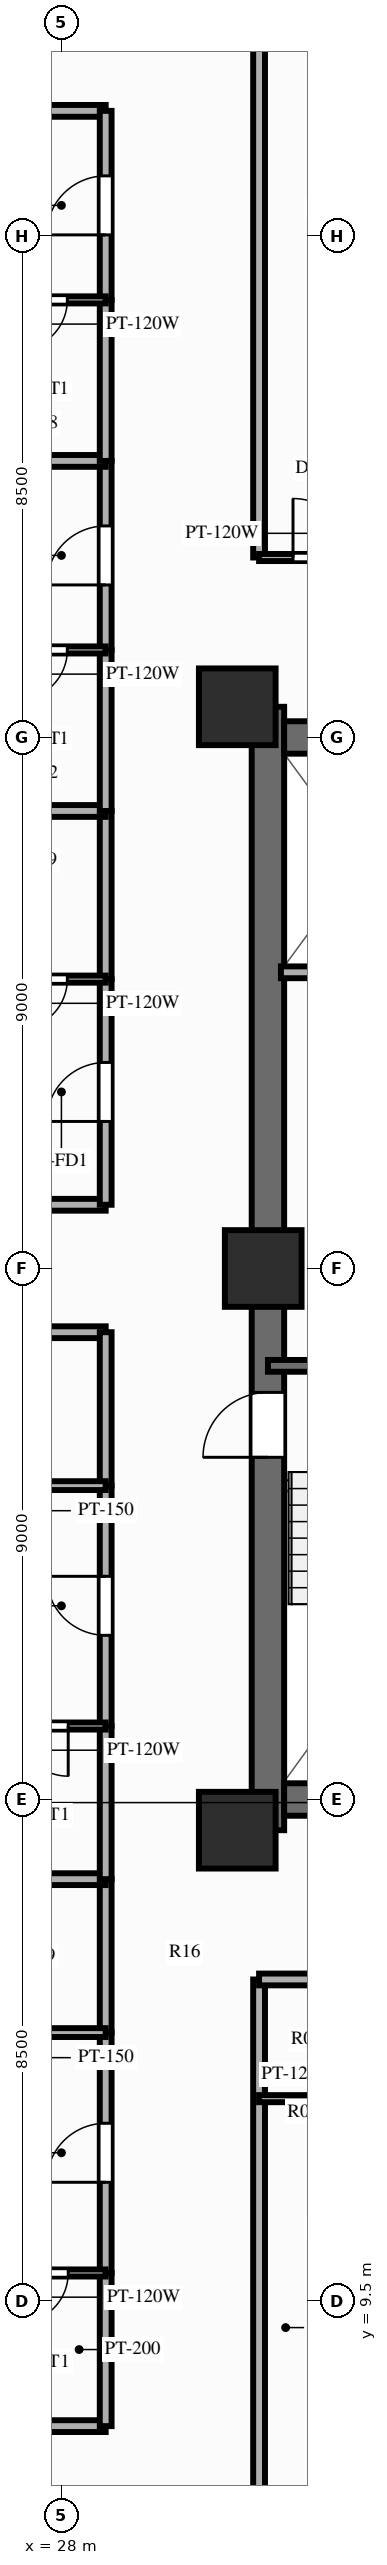
"""IFC4 building model, lengths in metres.
Left out: names, types, materials, properties, quantities, classifications, styles, units other than length and angle.
Written with IfcOpenShell. Run it as: python <this file> out.ifc"""

import sys

from ifc_helpers import new_model, si_unit, direction, frame, frame_2d, origin, origin_2d, place, context, subcontext, project, spatial, rectangle, extrude, source, transform, mapped, element, fill, save


model = new_model("IFC4")
c1 = context("Model", 3, precision=1e-05, world=origin(), true_north=direction((0.0, 1.0)))
c2 = subcontext(c1, "Body", "Model", "MODEL_VIEW")
j1 = project(units=[si_unit("LENGTHUNIT", "METRE"), si_unit("PLANEANGLEUNIT", "RADIAN")], contexts=[c1])
p1 = place(None, origin())
s1 = spatial("IfcSite", under=j1, at=p1, CompositionType="ELEMENT")
p2 = place(p1, origin())
s2 = spatial("IfcBuilding", under=s1, at=p2, CompositionType="ELEMENT")
p3 = place(p2, frame((0.0, 0.0, 119.85)))
s3 = spatial("IfcBuildingStorey", under=s2, at=p3, CompositionType="ELEMENT", Elevation=119.85)
p4 = place(p3, frame((31.5, 17.48, 0.0), z_axis=(0.0, 0.0, 1.0), x_axis=(0.0, 1.0, 0.0)))
e1 = element("IfcWall", 1, at=p4, inside=s3, PredefinedType="SHEAR", context=c2, shape_type="SweptSolid", body=[
    extrude(rectangle(XDim=19.04, YDim=0.55, at=frame_2d((9.52, 0.0))), origin(), (0.0, 0.0, 1.0), 3.0),
])
p5 = place(p4, frame((6.32, 0.0, 0.0)))
e2 = element("IfcOpeningElement", 2, at=p5, cuts=e1, PredefinedType="OPENING", context=c2, shape_type="SweptSolid", body=[
    extrude(rectangle(XDim=1.1, YDim=2.15, at=frame_2d((0.55, 1.075))), frame((0.0, 0.287, 0.0), z_axis=(0.0, -1.0, 0.0), x_axis=(1.0, 0.0, 0.0)), (0.0, 0.0, 1.0), 0.574),
])
p6 = place(p3, frame((31.775, 18.0, 0.0), z_axis=(0.0, 0.0, 1.0), x_axis=(1.0, 0.0, 0.0)))
e3 = element("IfcWall", 3, at=p6, inside=s3, PredefinedType="SHEAR", context=c2, shape_type="SweptSolid", body=[
    extrude(rectangle(XDim=12.45, YDim=0.55, at=frame_2d((6.225, 0.0))), origin(), (0.0, 0.0, 1.0), 3.0),
])
p7 = place(p3, frame((31.775, 36.0, 0.0), z_axis=(0.0, 0.0, 1.0), x_axis=(1.0, 0.0, 0.0)))
e4 = element("IfcWall", 4, at=p7, inside=s3, PredefinedType="SHEAR", context=c2, shape_type="SweptSolid", body=[
    extrude(rectangle(XDim=12.45, YDim=0.55, at=frame_2d((6.225, 0.0))), origin(), (0.0, 0.0, 1.0), 3.0),
])
p8 = place(p7, frame((5.175, 0.0, 0.0), z_axis=(0.0, 0.0, 1.0), x_axis=(-1.0, 0.0, 0.0)))
e5 = element("IfcOpeningElement", 5, at=p8, cuts=e4, PredefinedType="OPENING", context=c2, shape_type="SweptSolid", body=[
    extrude(rectangle(XDim=1.4, YDim=2.15, at=frame_2d((0.7, 1.075))), frame((0.0, 0.287, 0.0), z_axis=(0.0, -1.0, 0.0), x_axis=(1.0, 0.0, 0.0)), (0.0, 0.0, 1.0), 0.574),
])
m1 = source(origin(), c2, "Body", "SweptSolid", [
    extrude(rectangle(XDim=1.3, YDim=1.3, at=origin_2d()), origin(), (0.0, 0.0, 1.0), 3.0),
])
for number, where, z_axis, x_axis in (
    (6, (30.98, 17.48, 0.0), (0.0, 0.0, 1.0), (1.0, 0.0, 0.0)),
    (7, (30.98, 36.52, 0.0), (0.0, 0.0, 1.0), (1.0, 0.0, 0.0)),
    (8, (31.42, 27.0, 0.0), (0.0, 0.0, 1.0), (1.0, 0.0, 0.0)),
):
    element("IfcColumn", number, at=place(p3, frame(where, z_axis=z_axis, x_axis=x_axis)), inside=s3, PredefinedType="COLUMN", context=c2, shape_type="MappedRepresentation", body=[
        mapped(m1, transform((0.0, 0.0, 0.0), scale=1.0)),
    ])
p9 = place(p3, frame((31.5, 25.35, 0.0), z_axis=(0.0, 0.0, 1.0), x_axis=(1.0, 0.0, 0.0)))
e9 = element("IfcWall", 9, at=p9, inside=s3, PredefinedType="SOLIDWALL", context=c2, shape_type="SweptSolid", body=[
    extrude(rectangle(XDim=3.93, YDim=0.2, at=frame_2d((1.965, 0.0))), origin(), (0.0, 0.0, 1.0), 2.79),
])
p10 = place(p3, frame((31.72, 32.02, 0.0), z_axis=(0.0, 0.0, 1.0), x_axis=(1.0, 0.0, 0.0)))
e10 = element("IfcWall", 10, at=p10, inside=s3, PredefinedType="PARTITIONING", context=c2, shape_type="SweptSolid", body=[
    extrude(rectangle(XDim=2.8, YDim=0.2, at=frame_2d((1.4, 0.0))), origin(), (0.0, 0.0, 1.0), 2.79),
])
p11 = place(p3, frame((31.35, 14.95, 0.0), z_axis=(0.0, 0.0, 1.0), x_axis=(0.0, -1.0, 0.0)))
e11 = element("IfcWall", 11, at=p11, inside=s3, PredefinedType="PARTITIONING", context=c2, shape_type="SweptSolid", body=[
    extrude(rectangle(XDim=11.8, YDim=0.2, at=frame_2d((5.9, 0.0))), origin(), (0.0, 0.0, 1.0), 2.34),
])
p12 = place(p3, frame((31.35, 14.95, 0.0), z_axis=(0.0, 0.0, 1.0), x_axis=(1.0, 0.0, 0.0)))
e12 = element("IfcWall", 12, at=p12, inside=s3, PredefinedType="PARTITIONING", context=c2, shape_type="SweptSolid", body=[
    extrude(rectangle(XDim=3.458, YDim=0.2, at=frame_2d((1.729, 0.0))), origin(), (0.0, 0.0, 1.0), 2.79),
])
p13 = place(p3, frame((31.35, 12.93, 0.0), z_axis=(0.0, 0.0, 1.0), x_axis=(1.0, 0.0, 0.0)))
e13 = element("IfcWall", 13, at=p13, inside=s3, PredefinedType="PARTITIONING", context=c2, shape_type="SweptSolid", body=[
    extrude(rectangle(XDim=3.458, YDim=0.12, at=frame_2d((1.729, 0.0))), origin(), (0.0, 0.0, 1.0), 2.79),
])
p14 = place(p3, frame((31.35, 39.05, 0.0), z_axis=(0.0, 0.0, 1.0), x_axis=(0.0, 1.0, 0.0)))
e14 = element("IfcWall", 14, at=p14, inside=s3, PredefinedType="PARTITIONING", context=c2, shape_type="SweptSolid", body=[
    extrude(rectangle(XDim=11.8, YDim=0.2, at=frame_2d((5.9, 0.0))), origin(), (0.0, 0.0, 1.0), 2.34),
])
p15 = place(p3, frame((31.35, 39.05, 0.0), z_axis=(0.0, 0.0, 1.0), x_axis=(1.0, 0.0, 0.0)))
e15 = element("IfcWall", 15, at=p15, inside=s3, PredefinedType="PARTITIONING", context=c2, shape_type="SweptSolid", body=[
    extrude(rectangle(XDim=2.15, YDim=0.12, at=frame_2d((1.075, 0.0))), origin(), (0.0, 0.0, 1.0), 2.79),
])
p16 = place(p15, frame((0.575, 0.0, 0.0)))
e16 = element("IfcOpeningElement", 16, at=p16, cuts=e15, PredefinedType="OPENING", context=c2, shape_type="SweptSolid", body=[
    extrude(rectangle(XDim=1.0, YDim=2.1, at=frame_2d((0.5, 1.05))), frame((0.0, 0.072, 0.0), z_axis=(0.0, -1.0, 0.0), x_axis=(1.0, 0.0, 0.0)), (0.0, 0.0, 1.0), 0.144),
])
for number, where, z_axis, x_axis in (
    (17, (28.75, 7.38, 0.0), (0.0, 0.0, 1.0), (-1.0, 0.0, 0.0)),
    (18, (28.75, 25.92, 0.0), (0.0, 0.0, 1.0), (-1.0, 0.0, 0.0)),
):
    element("IfcWall", number, at=place(p3, frame(where, z_axis=z_axis, x_axis=x_axis)), inside=s3, PredefinedType="PARTITIONING", context=c2, shape_type="SweptSolid", body=[
        extrude(rectangle(XDim=16.6, YDim=0.2, at=frame_2d((8.3, 0.0))), origin(), (0.0, 0.0, 1.0), 2.79),
    ])
p17 = place(p3, frame((28.75, 7.38, 0.0), z_axis=(0.0, 0.0, 1.0), x_axis=(0.0, 1.0, 0.0)))
e19 = element("IfcWall", 19, at=p17, inside=s3, PredefinedType="PARTITIONING", context=c2, shape_type="SweptSolid", body=[
    extrude(rectangle(XDim=2.596, YDim=0.2, at=frame_2d((1.298, 0.0))), origin(), (0.0, 0.0, 1.0), 2.79),
])
p18 = place(p3, frame((28.75, 9.976, 0.0), z_axis=(0.0, 0.0, 1.0), x_axis=(0.0, 1.0, 0.0)))
e20 = element("IfcWall", 20, at=p18, inside=s3, PredefinedType="PARTITIONING", context=c2, shape_type="SweptSolid", body=[
    extrude(rectangle(XDim=4.074, YDim=0.2, at=frame_2d((2.037, 0.0))), origin(), (0.0, 0.0, 1.0), 2.79),
])
p19 = place(p18, frame((1.537, 0.0, 0.0)))
e21 = element("IfcOpeningElement", 21, at=p19, cuts=e20, PredefinedType="OPENING", context=c2, shape_type="SweptSolid", body=[
    extrude(rectangle(XDim=1.0, YDim=2.15, at=frame_2d((0.5, 1.075))), frame((0.0, 0.112, 0.0), z_axis=(0.0, -1.0, 0.0), x_axis=(1.0, 0.0, 0.0)), (0.0, 0.0, 1.0), 0.224),
])
p20 = place(p3, frame((28.75, 14.05, 0.0), z_axis=(0.0, 0.0, 1.0), x_axis=(0.0, 1.0, 0.0)))
e22 = element("IfcWall", 22, at=p20, inside=s3, PredefinedType="PARTITIONING", context=c2, shape_type="SweptSolid", body=[
    extrude(rectangle(XDim=2.6, YDim=0.2, at=frame_2d((1.3, 0.0))), origin(), (0.0, 0.0, 1.0), 2.79),
])
p21 = place(p3, frame((28.75, 9.976, 0.0), z_axis=(0.0, 0.0, 1.0), x_axis=(-1.0, 0.0, 0.0)))
e23 = element("IfcWall", 23, at=p21, inside=s3, PredefinedType="PARTITIONING", context=c2, shape_type="SweptSolid", body=[
    extrude(rectangle(XDim=2.12, YDim=0.12, at=frame_2d((1.06, 0.0))), origin(), (0.0, 0.0, 1.0), 2.79),
])
p22 = place(p21, frame((0.635, 0.0, 0.0)))
e24 = element("IfcOpeningElement", 24, at=p22, cuts=e23, PredefinedType="OPENING", context=c2, shape_type="SweptSolid", body=[
    extrude(rectangle(XDim=0.85, YDim=2.05, at=frame_2d((0.425, 1.025))), frame((0.0, 0.072, 0.0), z_axis=(0.0, -1.0, 0.0), x_axis=(1.0, 0.0, 0.0)), (0.0, 0.0, 1.0), 0.144),
])
p23 = place(p3, frame((28.75, 14.05, 0.0), z_axis=(0.0, 0.0, 1.0), x_axis=(-1.0, 0.0, 0.0)))
e25 = element("IfcWall", 25, at=p23, inside=s3, PredefinedType="PARTITIONING", context=c2, shape_type="SweptSolid", body=[
    extrude(rectangle(XDim=3.08, YDim=0.15, at=frame_2d((1.54, 0.0))), origin(), (0.0, 0.0, 1.0), 2.79),
])
p24 = place(p23, frame((1.09, 0.0, 0.0)))
e26 = element("IfcOpeningElement", 26, at=p24, cuts=e25, PredefinedType="OPENING", context=c2, shape_type="SweptSolid", body=[
    extrude(rectangle(XDim=0.9, YDim=2.1, at=frame_2d((0.45, 1.05))), frame((0.0, 0.087, 0.0), z_axis=(0.0, -1.0, 0.0), x_axis=(1.0, 0.0, 0.0)), (0.0, 0.0, 1.0), 0.174),
])
p25 = place(p3, frame((28.75, 16.65, 0.0), z_axis=(0.0, 0.0, 1.0), x_axis=(-1.0, 0.0, 0.0)))
e27 = element("IfcWall", 27, at=p25, inside=s3, PredefinedType="PARTITIONING", context=c2, shape_type="SweptSolid", body=[
    extrude(rectangle(XDim=16.6, YDim=0.2, at=frame_2d((8.3, 0.0))), origin(), (0.0, 0.0, 1.0), 2.79),
])
p26 = place(p3, frame((28.75, 16.65, 0.0), z_axis=(0.0, 0.0, 1.0), x_axis=(0.0, 1.0, 0.0)))
e28 = element("IfcWall", 28, at=p26, inside=s3, PredefinedType="PARTITIONING", context=c2, shape_type="SweptSolid", body=[
    extrude(rectangle(XDim=2.596, YDim=0.2, at=frame_2d((1.298, 0.0))), origin(), (0.0, 0.0, 1.0), 2.79),
])
p27 = place(p3, frame((28.75, 19.246, 0.0), z_axis=(0.0, 0.0, 1.0), x_axis=(0.0, 1.0, 0.0)))
e29 = element("IfcWall", 29, at=p27, inside=s3, PredefinedType="PARTITIONING", context=c2, shape_type="SweptSolid", body=[
    extrude(rectangle(XDim=4.074, YDim=0.2, at=frame_2d((2.037, 0.0))), origin(), (0.0, 0.0, 1.0), 2.79),
])
p28 = place(p27, frame((1.537, 0.0, 0.0)))
e30 = element("IfcOpeningElement", 30, at=p28, cuts=e29, PredefinedType="OPENING", context=c2, shape_type="SweptSolid", body=[
    extrude(rectangle(XDim=1.0, YDim=2.15, at=frame_2d((0.5, 1.075))), frame((0.0, 0.112, 0.0), z_axis=(0.0, -1.0, 0.0), x_axis=(1.0, 0.0, 0.0)), (0.0, 0.0, 1.0), 0.224),
])
p29 = place(p3, frame((28.75, 23.32, 0.0), z_axis=(0.0, 0.0, 1.0), x_axis=(0.0, 1.0, 0.0)))
e31 = element("IfcWall", 31, at=p29, inside=s3, PredefinedType="PARTITIONING", context=c2, shape_type="SweptSolid", body=[
    extrude(rectangle(XDim=2.6, YDim=0.2, at=frame_2d((1.3, 0.0))), origin(), (0.0, 0.0, 1.0), 2.79),
])
p30 = place(p3, frame((28.75, 19.246, 0.0), z_axis=(0.0, 0.0, 1.0), x_axis=(-1.0, 0.0, 0.0)))
e32 = element("IfcWall", 32, at=p30, inside=s3, PredefinedType="PARTITIONING", context=c2, shape_type="SweptSolid", body=[
    extrude(rectangle(XDim=2.12, YDim=0.12, at=frame_2d((1.06, 0.0))), origin(), (0.0, 0.0, 1.0), 2.79),
])
p31 = place(p30, frame((0.635, 0.0, 0.0)))
e33 = element("IfcOpeningElement", 33, at=p31, cuts=e32, PredefinedType="OPENING", context=c2, shape_type="SweptSolid", body=[
    extrude(rectangle(XDim=0.85, YDim=2.05, at=frame_2d((0.425, 1.025))), frame((0.0, 0.072, 0.0), z_axis=(0.0, -1.0, 0.0), x_axis=(1.0, 0.0, 0.0)), (0.0, 0.0, 1.0), 0.144),
])
p32 = place(p3, frame((28.75, 23.32, 0.0), z_axis=(0.0, 0.0, 1.0), x_axis=(-1.0, 0.0, 0.0)))
e34 = element("IfcWall", 34, at=p32, inside=s3, PredefinedType="PARTITIONING", context=c2, shape_type="SweptSolid", body=[
    extrude(rectangle(XDim=3.08, YDim=0.15, at=frame_2d((1.54, 0.0))), origin(), (0.0, 0.0, 1.0), 2.79),
])
p33 = place(p32, frame((1.09, 0.0, 0.0)))
e35 = element("IfcOpeningElement", 35, at=p33, cuts=e34, PredefinedType="OPENING", context=c2, shape_type="SweptSolid", body=[
    extrude(rectangle(XDim=0.9, YDim=2.1, at=frame_2d((0.45, 1.05))), frame((0.0, 0.087, 0.0), z_axis=(0.0, -1.0, 0.0), x_axis=(1.0, 0.0, 0.0)), (0.0, 0.0, 1.0), 0.174),
])
for number, where, z_axis, x_axis in (
    (36, (28.75, 28.08, 0.0), (0.0, 0.0, 1.0), (-1.0, 0.0, 0.0)),
    (37, (28.75, 46.62, 0.0), (0.0, 0.0, 1.0), (-1.0, 0.0, 0.0)),
):
    element("IfcWall", number, at=place(p3, frame(where, z_axis=z_axis, x_axis=x_axis)), inside=s3, PredefinedType="PARTITIONING", context=c2, shape_type="SweptSolid", body=[
        extrude(rectangle(XDim=16.6, YDim=0.2, at=frame_2d((8.3, 0.0))), origin(), (0.0, 0.0, 1.0), 2.79),
    ])
p34 = place(p3, frame((28.75, 28.08, 0.0), z_axis=(0.0, 0.0, 1.0), x_axis=(0.0, 1.0, 0.0)))
e38 = element("IfcWall", 38, at=p34, inside=s3, PredefinedType="PARTITIONING", context=c2, shape_type="SweptSolid", body=[
    extrude(rectangle(XDim=3.824, YDim=0.2, at=frame_2d((1.912, 0.0))), origin(), (0.0, 0.0, 1.0), 2.79),
])
p35 = place(p34, frame((1.412, 0.0, 0.0)))
e39 = element("IfcOpeningElement", 39, at=p35, cuts=e38, PredefinedType="OPENING", context=c2, shape_type="SweptSolid", body=[
    extrude(rectangle(XDim=1.0, YDim=2.15, at=frame_2d((0.5, 1.075))), frame((0.0, 0.112, 0.0), z_axis=(0.0, -1.0, 0.0), x_axis=(1.0, 0.0, 0.0)), (0.0, 0.0, 1.0), 0.224),
])
p36 = place(p3, frame((28.75, 31.904, 0.0), z_axis=(0.0, 0.0, 1.0), x_axis=(0.0, 1.0, 0.0)))
e40 = element("IfcWall", 40, at=p36, inside=s3, PredefinedType="PARTITIONING", context=c2, shape_type="SweptSolid", body=[
    extrude(rectangle(XDim=2.85, YDim=0.2, at=frame_2d((1.425, 0.0))), origin(), (0.0, 0.0, 1.0), 2.79),
])
p37 = place(p3, frame((28.75, 31.904, 0.0), z_axis=(0.0, 0.0, 1.0), x_axis=(-1.0, 0.0, 0.0)))
e41 = element("IfcWall", 41, at=p37, inside=s3, PredefinedType="PARTITIONING", context=c2, shape_type="SweptSolid", body=[
    extrude(rectangle(XDim=2.15, YDim=0.12, at=frame_2d((1.075, 0.0))), origin(), (0.0, 0.0, 1.0), 2.79),
])
p38 = place(p37, frame((0.65, 0.0, 0.0)))
e42 = element("IfcOpeningElement", 42, at=p38, cuts=e41, PredefinedType="OPENING", context=c2, shape_type="SweptSolid", body=[
    extrude(rectangle(XDim=0.85, YDim=2.05, at=frame_2d((0.425, 1.025))), frame((0.0, 0.072, 0.0), z_axis=(0.0, -1.0, 0.0), x_axis=(1.0, 0.0, 0.0)), (0.0, 0.0, 1.0), 0.144),
])
p39 = place(p3, frame((28.75, 34.754, 0.0), z_axis=(0.0, 0.0, 1.0), x_axis=(-1.0, 0.0, 0.0)))
e43 = element("IfcWall", 43, at=p39, inside=s3, PredefinedType="PARTITIONING", context=c2, shape_type="SweptSolid", body=[
    extrude(rectangle(XDim=16.6, YDim=0.2, at=frame_2d((8.3, 0.0))), origin(), (0.0, 0.0, 1.0), 2.79),
])
p40 = place(p3, frame((28.75, 34.754, 0.0), z_axis=(0.0, 0.0, 1.0), x_axis=(0.0, 1.0, 0.0)))
e44 = element("IfcWall", 44, at=p40, inside=s3, PredefinedType="PARTITIONING", context=c2, shape_type="SweptSolid", body=[
    extrude(rectangle(XDim=2.729, YDim=0.2, at=frame_2d((1.365, 0.0))), origin(), (0.0, 0.0, 1.0), 2.79),
])
p41 = place(p3, frame((28.75, 37.483, 0.0), z_axis=(0.0, 0.0, 1.0), x_axis=(0.0, 1.0, 0.0)))
e45 = element("IfcWall", 45, at=p41, inside=s3, PredefinedType="PARTITIONING", context=c2, shape_type="SweptSolid", body=[
    extrude(rectangle(XDim=3.204, YDim=0.2, at=frame_2d((1.602, 0.0))), origin(), (0.0, 0.0, 1.0), 2.79),
])
p42 = place(p41, frame((1.102, 0.0, 0.0)))
e46 = element("IfcOpeningElement", 46, at=p42, cuts=e45, PredefinedType="OPENING", context=c2, shape_type="SweptSolid", body=[
    extrude(rectangle(XDim=1.0, YDim=2.15, at=frame_2d((0.5, 1.075))), frame((0.0, 0.112, 0.0), z_axis=(0.0, -1.0, 0.0), x_axis=(1.0, 0.0, 0.0)), (0.0, 0.0, 1.0), 0.224),
])
p43 = place(p3, frame((28.75, 37.483, 0.0), z_axis=(0.0, 0.0, 1.0), x_axis=(-1.0, 0.0, 0.0)))
e47 = element("IfcWall", 47, at=p43, inside=s3, PredefinedType="PARTITIONING", context=c2, shape_type="SweptSolid", body=[
    extrude(rectangle(XDim=2.15, YDim=0.12, at=frame_2d((1.075, 0.0))), origin(), (0.0, 0.0, 1.0), 2.79),
])
p44 = place(p43, frame((0.65, 0.0, 0.0)))
e48 = element("IfcOpeningElement", 48, at=p44, cuts=e47, PredefinedType="OPENING", context=c2, shape_type="SweptSolid", body=[
    extrude(rectangle(XDim=0.85, YDim=2.05, at=frame_2d((0.425, 1.025))), frame((0.0, 0.072, 0.0), z_axis=(0.0, -1.0, 0.0), x_axis=(1.0, 0.0, 0.0)), (0.0, 0.0, 1.0), 0.144),
])
p45 = place(p3, frame((28.75, 40.687, 0.0), z_axis=(0.0, 0.0, 1.0), x_axis=(-1.0, 0.0, 0.0)))
e49 = element("IfcWall", 49, at=p45, inside=s3, PredefinedType="PARTITIONING", context=c2, shape_type="SweptSolid", body=[
    extrude(rectangle(XDim=16.6, YDim=0.2, at=frame_2d((8.3, 0.0))), origin(), (0.0, 0.0, 1.0), 2.79),
])
p46 = place(p3, frame((28.75, 40.687, 0.0), z_axis=(0.0, 0.0, 1.0), x_axis=(0.0, 1.0, 0.0)))
e50 = element("IfcWall", 50, at=p46, inside=s3, PredefinedType="PARTITIONING", context=c2, shape_type="SweptSolid", body=[
    extrude(rectangle(XDim=2.729, YDim=0.2, at=frame_2d((1.365, 0.0))), origin(), (0.0, 0.0, 1.0), 2.79),
])
p47 = place(p3, frame((28.75, 43.416, 0.0), z_axis=(0.0, 0.0, 1.0), x_axis=(0.0, 1.0, 0.0)))
e51 = element("IfcWall", 51, at=p47, inside=s3, PredefinedType="PARTITIONING", context=c2, shape_type="SweptSolid", body=[
    extrude(rectangle(XDim=3.204, YDim=0.2, at=frame_2d((1.602, 0.0))), origin(), (0.0, 0.0, 1.0), 2.79),
])
p48 = place(p47, frame((1.102, 0.0, 0.0)))
e52 = element("IfcOpeningElement", 52, at=p48, cuts=e51, PredefinedType="OPENING", context=c2, shape_type="SweptSolid", body=[
    extrude(rectangle(XDim=1.0, YDim=2.15, at=frame_2d((0.5, 1.075))), frame((0.0, 0.112, 0.0), z_axis=(0.0, -1.0, 0.0), x_axis=(1.0, 0.0, 0.0)), (0.0, 0.0, 1.0), 0.224),
])
p49 = place(p3, frame((28.75, 43.416, 0.0), z_axis=(0.0, 0.0, 1.0), x_axis=(-1.0, 0.0, 0.0)))
e53 = element("IfcWall", 53, at=p49, inside=s3, PredefinedType="PARTITIONING", context=c2, shape_type="SweptSolid", body=[
    extrude(rectangle(XDim=2.15, YDim=0.12, at=frame_2d((1.075, 0.0))), origin(), (0.0, 0.0, 1.0), 2.79),
])
p50 = place(p49, frame((0.65, 0.0, 0.0)))
e54 = element("IfcOpeningElement", 54, at=p50, cuts=e53, PredefinedType="OPENING", context=c2, shape_type="SweptSolid", body=[
    extrude(rectangle(XDim=0.85, YDim=2.05, at=frame_2d((0.425, 1.025))), frame((0.0, 0.072, 0.0), z_axis=(0.0, -1.0, 0.0), x_axis=(1.0, 0.0, 0.0)), (0.0, 0.0, 1.0), 0.144),
])
m2 = source(origin(), c2, "Body", "SweptSolid", [
    extrude(rectangle(XDim=1.1, YDim=2.15, at=frame_2d((0.55, 1.075))), frame((0.0, 0.025, 0.0), z_axis=(0.0, -1.0, 0.0), x_axis=(1.0, 0.0, 0.0)), (0.0, 0.0, 1.0), 0.05),
])
p51 = place(p5, origin())
e55 = element("IfcDoor", 55, at=p51, inside=s3, OperationType="SINGLE_SWING_LEFT", PredefinedType="DOOR", context=c2, shape_type="MappedRepresentation", body=[
    mapped(m2, transform((0.0, 0.0, 0.0), scale=1.0)),
])
fill(e2, e55)
m3 = source(origin(), c2, "Body", "SweptSolid", [
    extrude(rectangle(XDim=1.0, YDim=2.1, at=frame_2d((0.5, 1.05))), frame((0.0, 0.025, 0.0), z_axis=(0.0, -1.0, 0.0), x_axis=(1.0, 0.0, 0.0)), (0.0, 0.0, 1.0), 0.05),
])
p52 = place(p16, origin())
e56 = element("IfcDoor", 56, at=p52, inside=s3, OperationType="SINGLE_SWING_LEFT", PredefinedType="DOOR", context=c2, shape_type="MappedRepresentation", body=[
    mapped(m3, transform((0.0, 0.0, 0.0), scale=1.0)),
])
fill(e16, e56)
m4 = source(origin(), c2, "Body", "SweptSolid", [
    extrude(rectangle(XDim=1.0, YDim=2.15, at=frame_2d((0.5, 1.075))), frame((0.0, 0.025, 0.0), z_axis=(0.0, -1.0, 0.0), x_axis=(1.0, 0.0, 0.0)), (0.0, 0.0, 1.0), 0.05),
])
p53 = place(p19, origin())
e57 = element("IfcDoor", 57, at=p53, inside=s3, OperationType="SINGLE_SWING_LEFT", PredefinedType="DOOR", context=c2, shape_type="MappedRepresentation", body=[
    mapped(m4, transform((0.0, 0.0, 0.0), scale=1.0)),
])
fill(e21, e57)
m5 = source(origin(), c2, "Body", "SweptSolid", [
    extrude(rectangle(XDim=0.85, YDim=2.05, at=frame_2d((0.425, 1.025))), frame((0.0, 0.025, 0.0), z_axis=(0.0, -1.0, 0.0), x_axis=(1.0, 0.0, 0.0)), (0.0, 0.0, 1.0), 0.05),
])
p54 = place(p22, origin())
e58 = element("IfcDoor", 58, at=p54, inside=s3, OperationType="SINGLE_SWING_RIGHT", PredefinedType="DOOR", context=c2, shape_type="MappedRepresentation", body=[
    mapped(m5, transform((0.0, 0.0, 0.0), scale=1.0)),
])
fill(e24, e58)
p55 = place(p28, origin())
e59 = element("IfcDoor", 59, at=p55, inside=s3, OperationType="SINGLE_SWING_RIGHT", PredefinedType="DOOR", context=c2, shape_type="MappedRepresentation", body=[
    mapped(m4, transform((0.0, 0.0, 0.0), scale=1.0)),
])
fill(e30, e59)
p56 = place(p31, origin())
e60 = element("IfcDoor", 60, at=p56, inside=s3, OperationType="SINGLE_SWING_LEFT", PredefinedType="DOOR", context=c2, shape_type="MappedRepresentation", body=[
    mapped(m5, transform((0.0, 0.0, 0.0), scale=1.0)),
])
fill(e33, e60)
p57 = place(p35, origin())
e61 = element("IfcDoor", 61, at=p57, inside=s3, OperationType="SINGLE_SWING_LEFT", PredefinedType="DOOR", context=c2, shape_type="MappedRepresentation", body=[
    mapped(m4, transform((0.0, 0.0, 0.0), scale=1.0)),
])
fill(e39, e61)
p58 = place(p38, origin())
e62 = element("IfcDoor", 62, at=p58, inside=s3, OperationType="SINGLE_SWING_RIGHT", PredefinedType="DOOR", context=c2, shape_type="MappedRepresentation", body=[
    mapped(m5, transform((0.0, 0.0, 0.0), scale=1.0)),
])
fill(e42, e62)
p59 = place(p42, origin())
e63 = element("IfcDoor", 63, at=p59, inside=s3, OperationType="SINGLE_SWING_LEFT", PredefinedType="DOOR", context=c2, shape_type="MappedRepresentation", body=[
    mapped(m4, transform((0.0, 0.0, 0.0), scale=1.0)),
])
fill(e46, e63)
p60 = place(p44, origin())
e64 = element("IfcDoor", 64, at=p60, inside=s3, OperationType="SINGLE_SWING_RIGHT", PredefinedType="DOOR", context=c2, shape_type="MappedRepresentation", body=[
    mapped(m5, transform((0.0, 0.0, 0.0), scale=1.0)),
])
fill(e48, e64)
p61 = place(p48, origin())
e65 = element("IfcDoor", 65, at=p61, inside=s3, OperationType="SINGLE_SWING_LEFT", PredefinedType="DOOR", context=c2, shape_type="MappedRepresentation", body=[
    mapped(m4, transform((0.0, 0.0, 0.0), scale=1.0)),
])
fill(e52, e65)
p62 = place(p50, origin())
e66 = element("IfcDoor", 66, at=p62, inside=s3, OperationType="SINGLE_SWING_RIGHT", PredefinedType="DOOR", context=c2, shape_type="MappedRepresentation", body=[
    mapped(m5, transform((0.0, 0.0, 0.0), scale=1.0)),
])
fill(e54, e66)
save(model, sys.argv[1])
